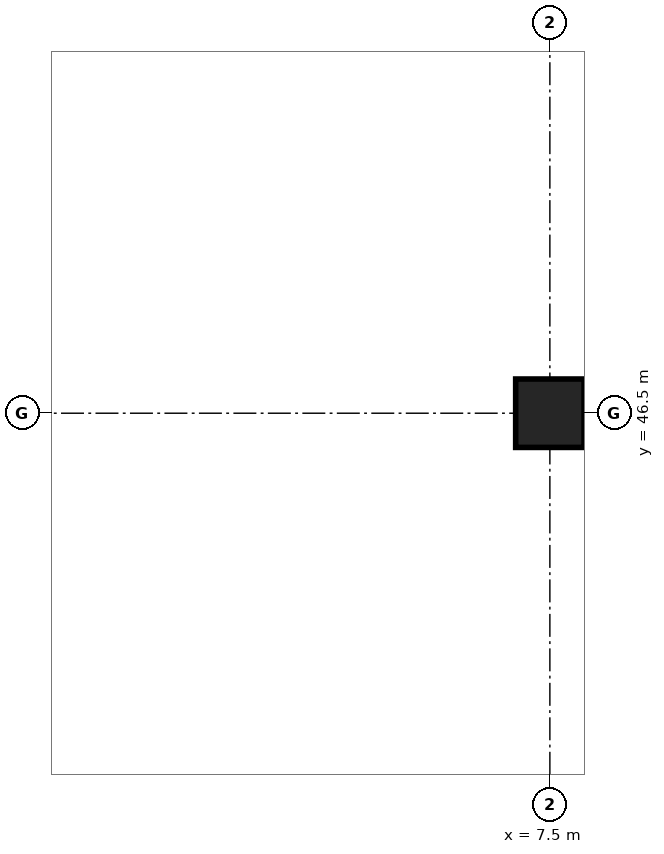
"""IFC4 building model, lengths in metres.
Left out: names, types, materials, properties, quantities, classifications, styles, units other than length and angle.
Written with IfcOpenShell. Run it as: python <this file> out.ifc"""

import sys

from ifc_helpers import new_model, si_unit, direction, frame, origin, origin_2d, place, context, subcontext, project, spatial, rectangle, extrude, element, save


model = new_model("IFC4")
c1 = context("Model", 3, precision=1e-05, world=origin(), true_north=direction((0.0, 1.0)))
c2 = subcontext(c1, "Body", "Model", "MODEL_VIEW")
j1 = project(units=[si_unit("LENGTHUNIT", "METRE"), si_unit("PLANEANGLEUNIT", "RADIAN")], contexts=[c1])
p1 = place(None, origin())
s1 = spatial("IfcSite", under=j1, at=p1, CompositionType="ELEMENT")
p2 = place(p1, origin())
s2 = spatial("IfcBuilding", under=s1, at=p2, CompositionType="ELEMENT")
p3 = place(p2, frame((0.0, 0.0, -4.5)))
s3 = spatial("IfcBuildingStorey", under=s2, at=p3, CompositionType="ELEMENT", Elevation=-4.5)
p4 = place(p3, frame((7.5, 46.5, 0.0), z_axis=(0.0, 0.0, 1.0), x_axis=(1.0, 0.0, 0.0)))
e1 = element("IfcColumn", 1, at=p4, inside=s3, PredefinedType="COLUMN", context=c2, shape_type="SweptSolid", body=[
    extrude(rectangle(XDim=0.9, YDim=0.9, at=origin_2d()), origin(), (0.0, 0.0, 1.0), 4.5),
])
save(model, sys.argv[1])
